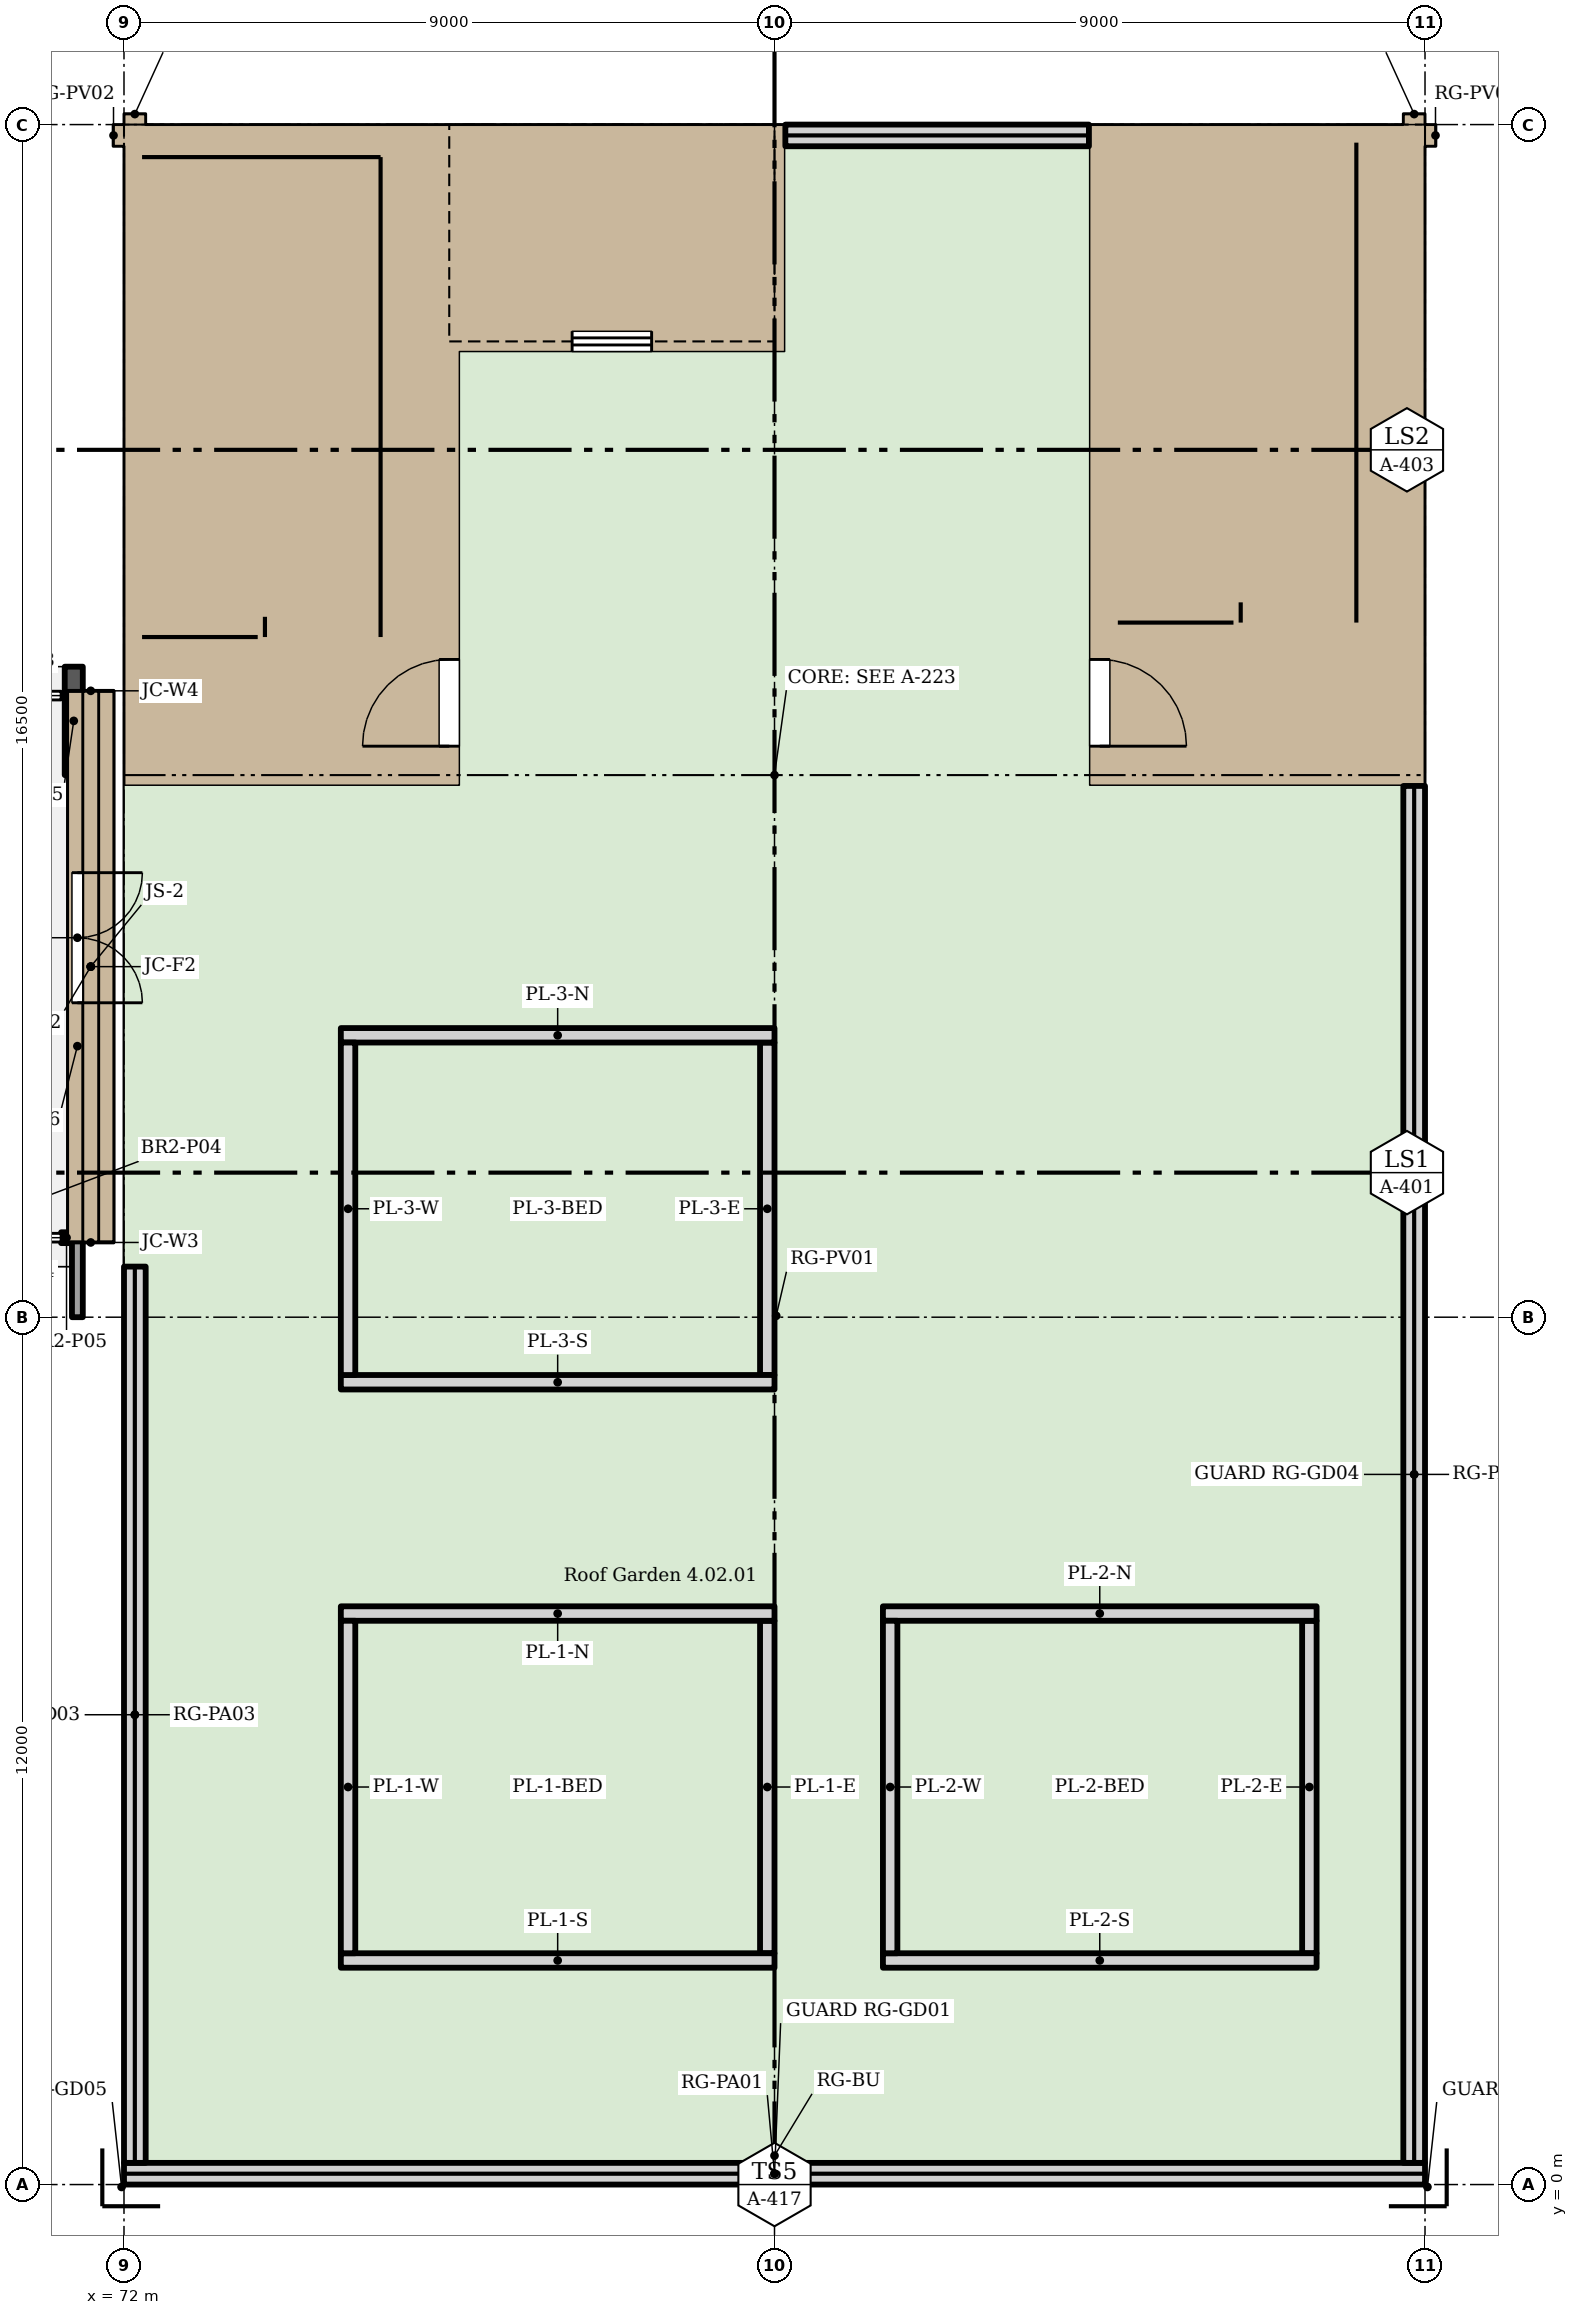
"""IFC4 building model, lengths in metres.
Left out: names, types, materials, properties, quantities, classifications, styles, units other than length and angle.
Written with IfcOpenShell. Run it as: python <this file> out.ifc"""

import sys

from ifc_helpers import new_model, si_unit, direction, frame, frame_2d, origin, place, context, subcontext, project, spatial, rectangle, extrude, element, fill, save


model = new_model("IFC4")
c1 = context("Model", 3, precision=1e-05, world=origin(), true_north=direction((0.0, 1.0)))
c2 = subcontext(c1, "Body", "Model", "MODEL_VIEW")
j1 = project(units=[si_unit("LENGTHUNIT", "METRE"), si_unit("PLANEANGLEUNIT", "RADIAN")], contexts=[c1])
p1 = place(None, origin())
s1 = spatial("IfcSite", under=j1, at=p1, CompositionType="ELEMENT")
p2 = place(p1, origin())
s2 = spatial("IfcBuilding", under=s1, at=p2, CompositionType="ELEMENT")
p3 = place(p2, frame((0.0, 0.0, 6.6)))
s3 = spatial("IfcBuildingStorey", under=s2, at=p3, CompositionType="ELEMENT", Elevation=6.6)
p4 = place(p3, frame((76.36, 25.5, 5.202), z_axis=(0.0, 0.0, 1.0), x_axis=(1.0, 0.0, 0.0)))
e1 = element("IfcWall", 1, at=p4, inside=s3, PredefinedType="SOLIDWALL", context=c2, shape_type="SweptSolid", body=[
    extrude(rectangle(XDim=4.78, YDim=0.28, at=frame_2d((2.39, 0.0))), origin(), (0.0, 0.0, 1.0), 3.1),
])
p5 = place(p4, frame((1.84, 0.0, 0.198)))
e2 = element("IfcOpeningElement", 2, at=p5, cuts=e1, PredefinedType="OPENING", context=c2, shape_type="SweptSolid", body=[
    extrude(rectangle(XDim=1.1, YDim=2.1, at=frame_2d((0.55, 1.05))), frame((0.0, 0.15, 0.0), z_axis=(0.0, -1.0, 0.0), x_axis=(1.0, 0.0, 0.0)), (0.0, 0.0, 1.0), 0.3),
])
p6 = place(p3, frame((76.36, 28.5, 5.202), z_axis=(0.0, 0.0, 1.0), x_axis=(1.0, 0.0, 0.0)))
e3 = element("IfcWall", 3, at=p6, inside=s3, PredefinedType="SOLIDWALL", context=c2, shape_type="SweptSolid", body=[
    extrude(rectangle(XDim=4.78, YDim=0.28, at=frame_2d((2.39, 0.0))), origin(), (0.0, 0.0, 1.0), 3.1),
])
p7 = place(p6, frame((1.84, 0.0, 2.4)))
e4 = element("IfcOpeningElement", 4, at=p7, cuts=e3, PredefinedType="OPENING", context=c2, shape_type="SweptSolid", body=[
    extrude(rectangle(XDim=1.1, YDim=0.6, at=frame_2d((0.55, 0.3))), frame((0.0, 0.15, 0.0), z_axis=(0.0, -1.0, 0.0), x_axis=(1.0, 0.0, 0.0)), (0.0, 0.0, 1.0), 0.3),
])
for number, where, z_axis, x_axis in (
    (5, (76.5, 25.64, 5.202), (0.0, 0.0, 1.0), (0.0, 1.0, 0.0)),
    (6, (81.0, 25.64, 5.202), (0.0, 0.0, 1.0), (0.0, 1.0, 0.0)),
):
    element("IfcWall", number, at=place(p3, frame(where, z_axis=z_axis, x_axis=x_axis)), inside=s3, PredefinedType="SOLIDWALL", context=c2, shape_type="SweptSolid", body=[
        extrude(rectangle(XDim=2.72, YDim=0.28, at=frame_2d((1.36, 0.0))), origin(), (0.0, 0.0, 1.0), 3.1),
    ])
p8 = place(p3, frame((71.43, 19.5, 5.202), z_axis=(0.0, 0.0, 1.0), x_axis=(1.0, 0.0, 0.0)))
e7 = element("IfcWall", 7, at=p8, inside=s3, PredefinedType="SOLIDWALL", context=c2, shape_type="SweptSolid", body=[
    extrude(rectangle(XDim=5.21, YDim=0.28, at=frame_2d((2.605, 0.0))), origin(), (0.0, 0.0, 1.0), 3.1),
])
p9 = place(p8, frame((2.055, 0.0, 2.4)))
e8 = element("IfcOpeningElement", 8, at=p9, cuts=e7, PredefinedType="OPENING", context=c2, shape_type="SweptSolid", body=[
    extrude(rectangle(XDim=1.1, YDim=0.6, at=frame_2d((0.55, 0.3))), frame((0.0, 0.15, 0.0), z_axis=(0.0, -1.0, 0.0), x_axis=(1.0, 0.0, 0.0)), (0.0, 0.0, 1.0), 0.3),
])
p10 = place(p3, frame((71.86, 28.5, 5.202), z_axis=(0.0, 0.0, 1.0), x_axis=(1.0, 0.0, 0.0)))
e9 = element("IfcWall", 9, at=p10, inside=s3, PredefinedType="SOLIDWALL", context=c2, shape_type="SweptSolid", body=[
    extrude(rectangle(XDim=4.5, YDim=0.28, at=frame_2d((2.25, 0.0))), origin(), (0.0, 0.0, 1.0), 3.1),
])
p11 = place(p3, frame((72.0, 19.64, 5.202), z_axis=(0.0, 0.0, 1.0), x_axis=(0.0, 1.0, 0.0)))
e10 = element("IfcWall", 10, at=p11, inside=s3, PredefinedType="SOLIDWALL", context=c2, shape_type="SweptSolid", body=[
    extrude(rectangle(XDim=8.72, YDim=0.28, at=frame_2d((4.36, 0.0))), origin(), (0.0, 0.0, 1.0), 3.1),
])
p12 = place(p3, frame((76.5, 19.64, 5.202), z_axis=(0.0, 0.0, 1.0), x_axis=(0.0, 1.0, 0.0)))
e11 = element("IfcWall", 11, at=p12, inside=s3, PredefinedType="SOLIDWALL", context=c2, shape_type="SweptSolid", body=[
    extrude(rectangle(XDim=5.72, YDim=0.28, at=frame_2d((2.86, 0.0))), origin(), (0.0, 0.0, 1.0), 3.1),
])
p13 = place(p12, frame((0.26, 0.0, 0.198)))
e12 = element("IfcOpeningElement", 12, at=p13, cuts=e11, PredefinedType="OPENING", context=c2, shape_type="SweptSolid", body=[
    extrude(rectangle(XDim=1.2, YDim=2.1, at=frame_2d((0.6, 1.05))), frame((0.0, 0.15, 0.0), z_axis=(0.0, -1.0, 0.0), x_axis=(1.0, 0.0, 0.0)), (0.0, 0.0, 1.0), 0.3),
])
p14 = place(p3, frame((85.36, 19.5, 5.202), z_axis=(0.0, 0.0, 1.0), x_axis=(1.0, 0.0, 0.0)))
e13 = element("IfcWall", 13, at=p14, inside=s3, PredefinedType="SOLIDWALL", context=c2, shape_type="SweptSolid", body=[
    extrude(rectangle(XDim=4.78, YDim=0.28, at=frame_2d((2.39, 0.0))), origin(), (0.0, 0.0, 1.0), 3.1),
])
p15 = place(p14, frame((1.84, 0.0, 2.4)))
e14 = element("IfcOpeningElement", 14, at=p15, cuts=e13, PredefinedType="OPENING", context=c2, shape_type="SweptSolid", body=[
    extrude(rectangle(XDim=1.1, YDim=0.6, at=frame_2d((0.55, 0.3))), frame((0.0, 0.15, 0.0), z_axis=(0.0, -1.0, 0.0), x_axis=(1.0, 0.0, 0.0)), (0.0, 0.0, 1.0), 0.3),
])
p16 = place(p3, frame((85.36, 28.5, 5.202), z_axis=(0.0, 0.0, 1.0), x_axis=(1.0, 0.0, 0.0)))
e15 = element("IfcWall", 15, at=p16, inside=s3, PredefinedType="SOLIDWALL", context=c2, shape_type="SweptSolid", body=[
    extrude(rectangle(XDim=4.78, YDim=0.28, at=frame_2d((2.39, 0.0))), origin(), (0.0, 0.0, 1.0), 3.1),
])
p17 = place(p3, frame((85.5, 19.64, 5.202), z_axis=(0.0, 0.0, 1.0), x_axis=(0.0, 1.0, 0.0)))
e16 = element("IfcWall", 16, at=p17, inside=s3, PredefinedType="SOLIDWALL", context=c2, shape_type="SweptSolid", body=[
    extrude(rectangle(XDim=8.72, YDim=0.28, at=frame_2d((4.36, 0.0))), origin(), (0.0, 0.0, 1.0), 3.1),
])
p18 = place(p17, frame((1.46, 0.0, 0.198), z_axis=(0.0, 0.0, 1.0), x_axis=(-1.0, 0.0, 0.0)))
e17 = element("IfcOpeningElement", 17, at=p18, cuts=e16, PredefinedType="OPENING", context=c2, shape_type="SweptSolid", body=[
    extrude(rectangle(XDim=1.2, YDim=2.1, at=frame_2d((0.6, 1.05))), frame((0.0, 0.15, 0.0), z_axis=(0.0, -1.0, 0.0), x_axis=(1.0, 0.0, 0.0)), (0.0, 0.0, 1.0), 0.3),
])
p19 = place(p3, frame((90.0, 19.64, 5.202), z_axis=(0.0, 0.0, 1.0), x_axis=(0.0, 1.0, 0.0)))
e18 = element("IfcWall", 18, at=p19, inside=s3, PredefinedType="SOLIDWALL", context=c2, shape_type="SweptSolid", body=[
    extrude(rectangle(XDim=8.72, YDim=0.28, at=frame_2d((4.36, 0.0))), origin(), (0.0, 0.0, 1.0), 3.1),
])
p20 = place(p2, frame((0.0, 0.0, 12.0)))
s4 = spatial("IfcBuildingStorey", under=s2, at=p20, CompositionType="ELEMENT", Elevation=12.0)
p21 = place(p20, frame((72.0, 0.15, -0.198), z_axis=(0.0, 0.0, 1.0), x_axis=(1.0, 0.0, 0.0)))
e19 = element("IfcWall", 19, at=p21, inside=s4, PredefinedType="PARAPET", context=c2, shape_type="SweptSolid", body=[
    extrude(rectangle(XDim=18.0, YDim=0.3, at=frame_2d((9.0, 0.0))), origin(), (0.0, 0.0, 1.0), 0.6),
])
p22 = place(p20, frame((81.15, 28.35, -0.198), z_axis=(0.0, 0.0, 1.0), x_axis=(1.0, 0.0, 0.0)))
e20 = element("IfcWall", 20, at=p22, inside=s4, PredefinedType="PARAPET", context=c2, shape_type="SweptSolid", body=[
    extrude(rectangle(XDim=4.2, YDim=0.3, at=frame_2d((2.1, 0.0))), origin(), (0.0, 0.0, 1.0), 0.6),
])
p23 = place(p20, frame((72.15, 0.3, -0.198), z_axis=(0.0, 0.0, 1.0), x_axis=(0.0, 1.0, 0.0)))
e21 = element("IfcWall", 21, at=p23, inside=s4, PredefinedType="PARAPET", context=c2, shape_type="SweptSolid", body=[
    extrude(rectangle(XDim=12.4, YDim=0.3, at=frame_2d((6.2, 0.0))), origin(), (0.0, 0.0, 1.0), 0.6),
])
p24 = place(p20, frame((89.85, 0.3, -0.198), z_axis=(0.0, 0.0, 1.0), x_axis=(0.0, 1.0, 0.0)))
e22 = element("IfcWall", 22, at=p24, inside=s4, PredefinedType="PARAPET", context=c2, shape_type="SweptSolid", body=[
    extrude(rectangle(XDim=19.05, YDim=0.3, at=frame_2d((9.525, 0.0))), origin(), (0.0, 0.0, 1.0), 0.6),
])
for number, where, z_axis, x_axis in (
    (23, (75.0, 3.1, -0.198), (0.0, 0.0, 1.0), (1.0, 0.0, 0.0)),
    (24, (75.0, 7.9, -0.198), (0.0, 0.0, 1.0), (1.0, 0.0, 0.0)),
):
    element("IfcWall", number, at=place(p20, frame(where, z_axis=z_axis, x_axis=x_axis)), inside=s4, PredefinedType="SOLIDWALL", context=c2, shape_type="SweptSolid", body=[
        extrude(rectangle(XDim=6.0, YDim=0.2, at=frame_2d((3.0, 0.0))), origin(), (0.0, 0.0, 1.0), 0.758),
    ])
for number, where, z_axis, x_axis in (
    (25, (75.1, 3.2, -0.198), (0.0, 0.0, 1.0), (0.0, 1.0, 0.0)),
    (26, (80.9, 3.2, -0.198), (0.0, 0.0, 1.0), (0.0, 1.0, 0.0)),
):
    element("IfcWall", number, at=place(p20, frame(where, z_axis=z_axis, x_axis=x_axis)), inside=s4, PredefinedType="SOLIDWALL", context=c2, shape_type="SweptSolid", body=[
        extrude(rectangle(XDim=4.6, YDim=0.2, at=frame_2d((2.3, 0.0))), origin(), (0.0, 0.0, 1.0), 0.758),
    ])
for number, where, z_axis, x_axis in (
    (27, (82.5, 3.1, -0.198), (0.0, 0.0, 1.0), (1.0, 0.0, 0.0)),
    (28, (82.5, 7.9, -0.198), (0.0, 0.0, 1.0), (1.0, 0.0, 0.0)),
):
    element("IfcWall", number, at=place(p20, frame(where, z_axis=z_axis, x_axis=x_axis)), inside=s4, PredefinedType="SOLIDWALL", context=c2, shape_type="SweptSolid", body=[
        extrude(rectangle(XDim=6.0, YDim=0.2, at=frame_2d((3.0, 0.0))), origin(), (0.0, 0.0, 1.0), 0.758),
    ])
for number, where, z_axis, x_axis in (
    (29, (82.6, 3.2, -0.198), (0.0, 0.0, 1.0), (0.0, 1.0, 0.0)),
    (30, (88.4, 3.2, -0.198), (0.0, 0.0, 1.0), (0.0, 1.0, 0.0)),
):
    element("IfcWall", number, at=place(p20, frame(where, z_axis=z_axis, x_axis=x_axis)), inside=s4, PredefinedType="SOLIDWALL", context=c2, shape_type="SweptSolid", body=[
        extrude(rectangle(XDim=4.6, YDim=0.2, at=frame_2d((2.3, 0.0))), origin(), (0.0, 0.0, 1.0), 0.758),
    ])
for number, where, z_axis, x_axis in (
    (31, (75.0, 11.1, -0.198), (0.0, 0.0, 1.0), (1.0, 0.0, 0.0)),
    (32, (75.0, 15.9, -0.198), (0.0, 0.0, 1.0), (1.0, 0.0, 0.0)),
):
    element("IfcWall", number, at=place(p20, frame(where, z_axis=z_axis, x_axis=x_axis)), inside=s4, PredefinedType="SOLIDWALL", context=c2, shape_type="SweptSolid", body=[
        extrude(rectangle(XDim=6.0, YDim=0.2, at=frame_2d((3.0, 0.0))), origin(), (0.0, 0.0, 1.0), 0.758),
    ])
for number, where, z_axis, x_axis in (
    (33, (75.1, 11.2, -0.198), (0.0, 0.0, 1.0), (0.0, 1.0, 0.0)),
    (34, (80.9, 11.2, -0.198), (0.0, 0.0, 1.0), (0.0, 1.0, 0.0)),
):
    element("IfcWall", number, at=place(p20, frame(where, z_axis=z_axis, x_axis=x_axis)), inside=s4, PredefinedType="SOLIDWALL", context=c2, shape_type="SweptSolid", body=[
        extrude(rectangle(XDim=4.6, YDim=0.2, at=frame_2d((2.3, 0.0))), origin(), (0.0, 0.0, 1.0), 0.758),
    ])
p25 = place(p20, frame((71.305, 19.5, 0.0), z_axis=(0.0, 0.0, 1.0), x_axis=(0.0, 1.0, 0.0)))
e35 = element("IfcWall", 35, at=p25, inside=s4, PredefinedType="SHEAR", context=c2, shape_type="SweptSolid", body=[
    extrude(rectangle(XDim=1.5, YDim=0.25, at=frame_2d((0.75, 0.0))), origin(), (0.0, 0.0, 1.0), 2.902),
])
p26 = place(p20, frame((71.355, 12.0, 0.0), z_axis=(0.0, 0.0, 1.0), x_axis=(0.0, 1.0, 0.0)))
e36 = element("IfcWall", 36, at=p26, inside=s4, PredefinedType="PARTITIONING", context=c2, shape_type="SweptSolid", body=[
    extrude(rectangle(XDim=7.5, YDim=0.15, at=frame_2d((3.75, 0.0))), origin(), (0.0, 0.0, 1.0), 2.902),
])
p27 = place(p26, frame((6.15, 0.0, 0.0), z_axis=(0.0, 0.0, 1.0), x_axis=(-1.0, 0.0, 0.0)))
e37 = element("IfcOpeningElement", 37, at=p27, cuts=e36, PredefinedType="OPENING", context=c2, shape_type="SweptSolid", body=[
    extrude(rectangle(XDim=1.8, YDim=2.4, at=frame_2d((0.9, 1.2))), frame((0.0, 0.085, 0.0), z_axis=(0.0, -1.0, 0.0), x_axis=(1.0, 0.0, 0.0)), (0.0, 0.0, 1.0), 0.17),
])
p28 = place(p20, frame((71.13, 13.1, 0.0), z_axis=(0.0, 0.0, 1.0), x_axis=(1.0, 0.0, 0.0)))
e38 = element("IfcWall", 38, at=p28, inside=s4, PredefinedType="SOLIDWALL", context=c2, shape_type="SweptSolid", body=[
    extrude(rectangle(XDim=0.15, YDim=0.15, at=frame_2d((0.075, 0.0))), origin(), (0.0, 0.0, 1.0), 3.3),
])
p29 = place(p27, origin())
e39 = element("IfcDoor", 39, at=p29, inside=s4, OperationType="DOUBLE_DOOR_SINGLE_SWING", PredefinedType="DOOR", context=c2, shape_type="SweptSolid", body=[
    extrude(rectangle(XDim=1.8, YDim=2.4, at=frame_2d((0.9, 1.2))), frame((0.0, 0.025, 0.0), z_axis=(0.0, -1.0, 0.0), x_axis=(1.0, 0.0, 0.0)), (0.0, 0.0, 1.0), 0.05),
])
fill(e37, e39)
p30 = place(p13, origin())
e40 = element("IfcDoor", 40, at=p30, inside=s4, OperationType="SINGLE_SWING_LEFT", PredefinedType="DOOR", context=c2, shape_type="SweptSolid", body=[
    extrude(rectangle(XDim=1.2, YDim=2.1, at=frame_2d((0.6, 1.05))), frame((0.0, 0.025, 0.0), z_axis=(0.0, -1.0, 0.0), x_axis=(1.0, 0.0, 0.0)), (0.0, 0.0, 1.0), 0.05),
])
fill(e12, e40)
p31 = place(p18, origin())
e41 = element("IfcDoor", 41, at=p31, inside=s4, OperationType="SINGLE_SWING_RIGHT", PredefinedType="DOOR", context=c2, shape_type="SweptSolid", body=[
    extrude(rectangle(XDim=1.2, YDim=2.1, at=frame_2d((0.6, 1.05))), frame((0.0, 0.025, 0.0), z_axis=(0.0, -1.0, 0.0), x_axis=(1.0, 0.0, 0.0)), (0.0, 0.0, 1.0), 0.05),
])
fill(e17, e41)
p32 = place(p5, origin())
e42 = element("IfcDoor", 42, at=p32, inside=s4, OperationType="SLIDING_TO_LEFT", PredefinedType="DOOR", context=c2, shape_type="SweptSolid", body=[
    extrude(rectangle(XDim=1.1, YDim=2.1, at=frame_2d((0.55, 1.05))), frame((0.0, 0.025, 0.0), z_axis=(0.0, -1.0, 0.0), x_axis=(1.0, 0.0, 0.0)), (0.0, 0.0, 1.0), 0.05),
])
fill(e2, e42)
save(model, sys.argv[1])
